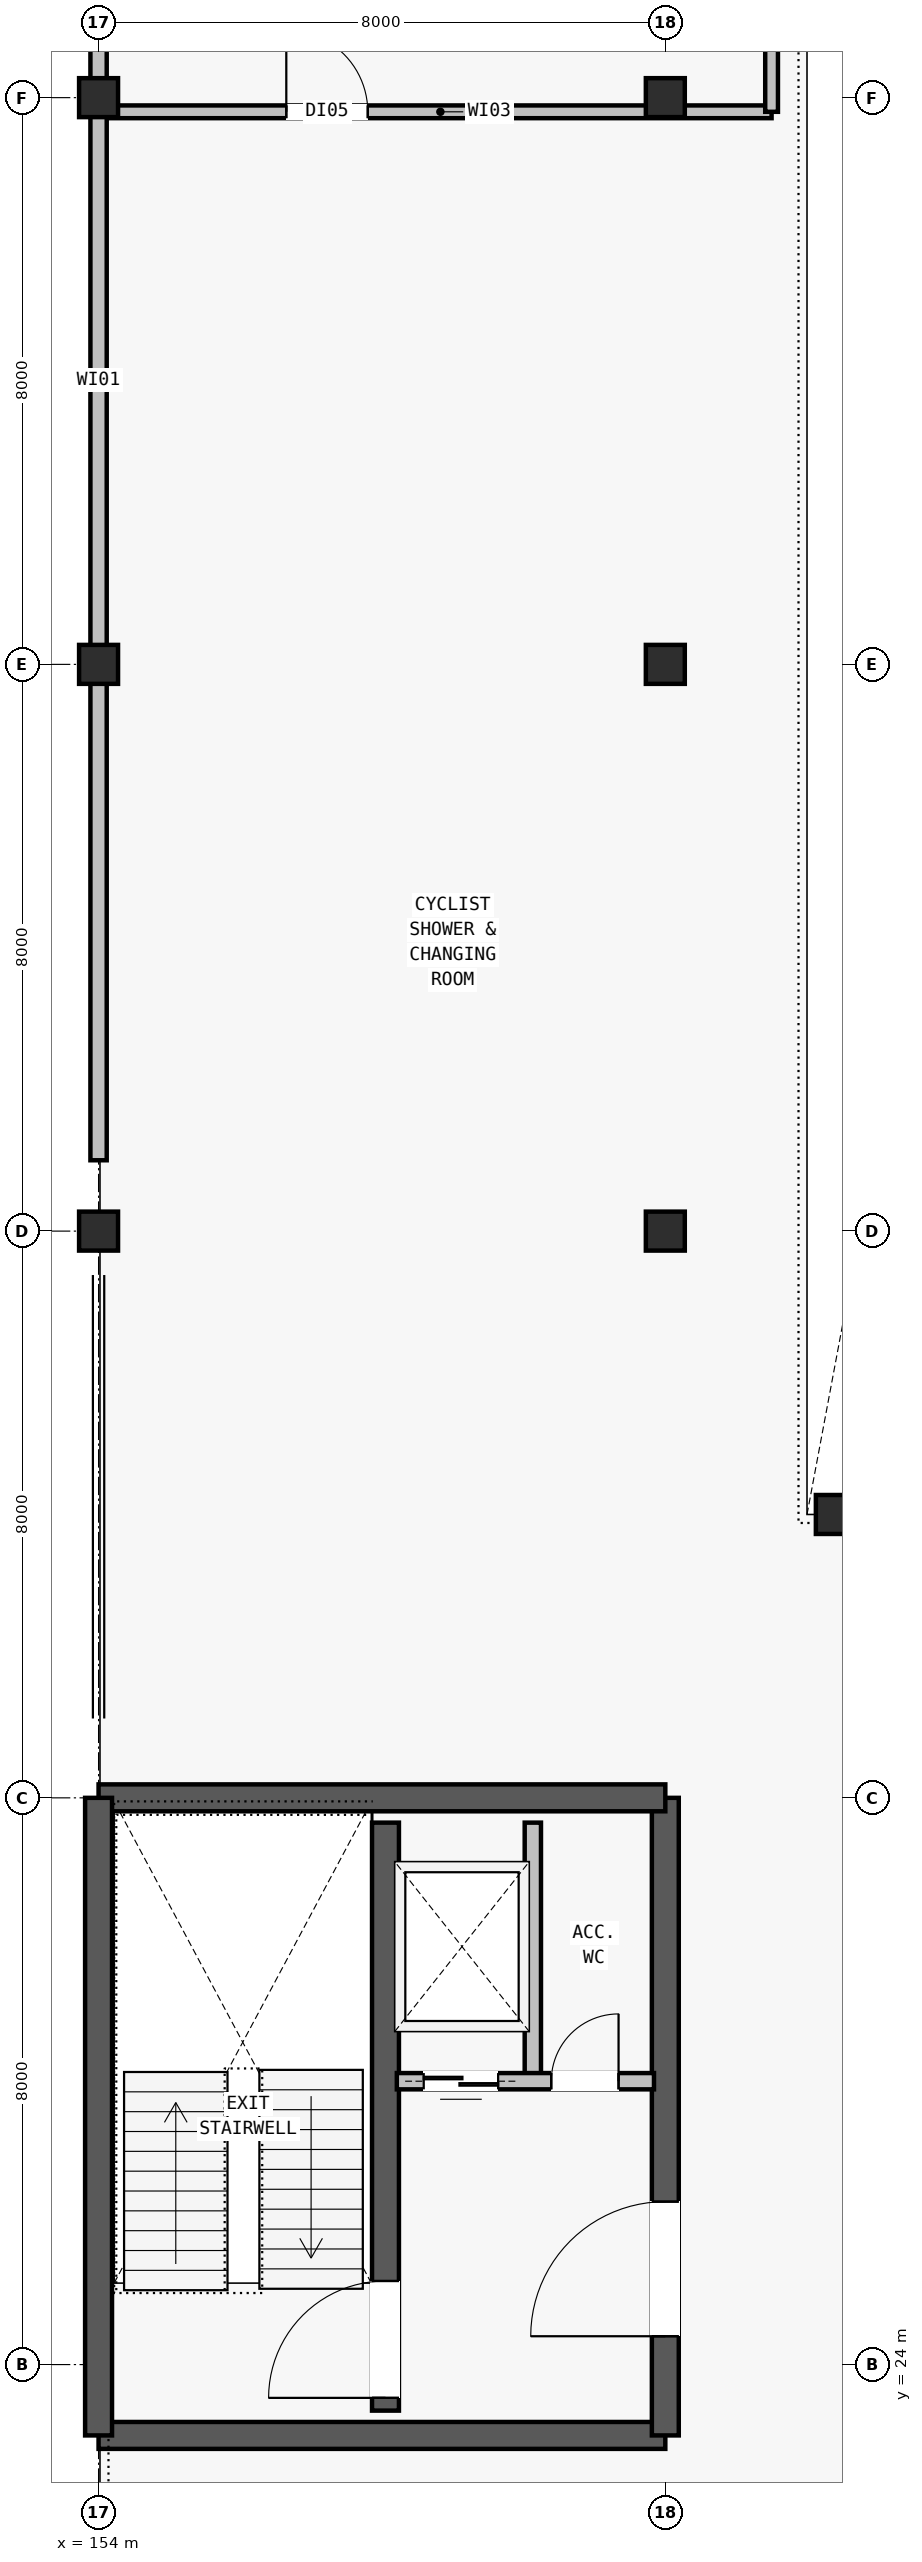
"""IFC4 building model, lengths in metres.
Left out: names, types, materials, properties, quantities, classifications, styles, units other than length and angle.
Written with IfcOpenShell. Run it as: python <this file> out.ifc"""

import sys

from ifc_helpers import new_model, si_unit, direction, frame, frame_2d, origin, origin_2d, place, context, subcontext, project, spatial, rectangle, extrude, element, fill, save


model = new_model("IFC4")
c1 = context("Model", 3, precision=1e-05, world=origin(), true_north=direction((0.0, 1.0)))
c2 = subcontext(c1, "Body", "Model", "MODEL_VIEW")
j1 = project(units=[si_unit("LENGTHUNIT", "METRE"), si_unit("PLANEANGLEUNIT", "RADIAN")], contexts=[c1])
p1 = place(None, origin())
s1 = spatial("IfcSite", under=j1, at=p1, CompositionType="ELEMENT")
p2 = place(p1, origin())
s2 = spatial("IfcBuilding", under=s1, at=p2, CompositionType="ELEMENT")
p3 = place(p2, frame((0.0, 0.0, 13.4)))
s3 = spatial("IfcBuildingStorey", under=s2, at=p3, CompositionType="ELEMENT", Elevation=13.4)
for number, where, z_axis, x_axis in (
    (1, (154.0, 40.0, 0.0), (0.0, 0.0, 1.0), (1.0, 0.0, 0.0)),
    (2, (154.0, 48.0, 0.0), (0.0, 0.0, 1.0), (1.0, 0.0, 0.0)),
    (3, (154.0, 56.0, 0.0), (0.0, 0.0, 1.0), (1.0, 0.0, 0.0)),
    (4, (162.0, 40.0, 0.0), (0.0, 0.0, 1.0), (1.0, 0.0, 0.0)),
    (5, (162.0, 48.0, 0.0), (0.0, 0.0, 1.0), (1.0, 0.0, 0.0)),
    (6, (162.0, 56.0, 0.0), (0.0, 0.0, 1.0), (1.0, 0.0, 0.0)),
    (7, (164.4, 36.0, 0.0), (0.0, 0.0, 1.0), (1.0, 0.0, 0.0)),
):
    element("IfcColumn", number, at=place(p3, frame(where, z_axis=z_axis, x_axis=x_axis)), inside=s3, PredefinedType="COLUMN", context=c2, shape_type="SweptSolid", body=[
        extrude(rectangle(XDim=0.55, YDim=0.55, at=origin_2d()), origin(), (0.0, 0.0, 1.0), 3.9),
    ])
p4 = place(p3, frame((154.0, 23.0, 0.0), z_axis=(0.0, 0.0, 1.0), x_axis=(1.0, 0.0, 0.0)))
e8 = element("IfcWall", 8, at=p4, inside=s3, PredefinedType="SHEAR", context=c2, shape_type="SweptSolid", body=[
    extrude(rectangle(XDim=8.0, YDim=0.38, at=frame_2d((4.0, 0.0))), origin(), (0.0, 0.0, 1.0), 3.62),
])
p5 = place(p3, frame((162.0, 23.0, 0.0), z_axis=(0.0, 0.0, 1.0), x_axis=(0.0, 1.0, 0.0)))
e9 = element("IfcWall", 9, at=p5, inside=s3, PredefinedType="SHEAR", context=c2, shape_type="SweptSolid", body=[
    extrude(rectangle(XDim=9.0, YDim=0.38, at=frame_2d((4.5, 0.0))), origin(), (0.0, 0.0, 1.0), 3.62),
])
p6 = place(p5, frame((1.4, 0.0, 0.0)))
e10 = element("IfcOpeningElement", 10, at=p6, cuts=e9, PredefinedType="OPENING", context=c2, shape_type="SweptSolid", body=[
    extrude(rectangle(XDim=1.9, YDim=2.3, at=frame_2d((0.95, 1.15))), frame((0.0, 0.2, 0.0), z_axis=(0.0, -1.0, 0.0), x_axis=(1.0, 0.0, 0.0)), (0.0, 0.0, 1.0), 0.4),
])
p7 = place(p3, frame((162.0, 32.0, 0.0), z_axis=(0.0, 0.0, 1.0), x_axis=(-1.0, 0.0, 0.0)))
e11 = element("IfcWall", 11, at=p7, inside=s3, PredefinedType="SHEAR", context=c2, shape_type="SweptSolid", body=[
    extrude(rectangle(XDim=8.0, YDim=0.38, at=frame_2d((4.0, 0.0))), origin(), (0.0, 0.0, 1.0), 3.62),
])
p8 = place(p3, frame((154.0, 32.0, 0.0), z_axis=(0.0, 0.0, 1.0), x_axis=(0.0, -1.0, 0.0)))
e12 = element("IfcWall", 12, at=p8, inside=s3, PredefinedType="SHEAR", context=c2, shape_type="SweptSolid", body=[
    extrude(rectangle(XDim=9.0, YDim=0.38, at=frame_2d((4.5, 0.0))), origin(), (0.0, 0.0, 1.0), 3.62),
])
p9 = place(p3, frame((158.05, 23.35, 0.0), z_axis=(0.0, 0.0, 1.0), x_axis=(0.0, 1.0, 0.0)))
e13 = element("IfcWall", 13, at=p9, inside=s3, PredefinedType="SHEAR", context=c2, shape_type="SweptSolid", body=[
    extrude(rectangle(XDim=8.3, YDim=0.38, at=frame_2d((4.15, 0.0))), origin(), (0.0, 0.0, 1.0), 3.62),
])
p10 = place(p9, frame((0.18, 0.0, 0.0)))
e14 = element("IfcOpeningElement", 14, at=p10, cuts=e13, PredefinedType="OPENING", context=c2, shape_type="SweptSolid", body=[
    extrude(rectangle(XDim=1.65, YDim=2.2, at=frame_2d((0.825, 1.1))), frame((0.0, 0.2, 0.0), z_axis=(0.0, -1.0, 0.0), x_axis=(1.0, 0.0, 0.0)), (0.0, 0.0, 1.0), 0.4),
])
p11 = place(p3, frame((160.13, 28.0, 0.0), z_axis=(0.0, 0.0, 1.0), x_axis=(0.0, 1.0, 0.0)))
e15 = element("IfcWall", 15, at=p11, inside=s3, PredefinedType="PARTITIONING", context=c2, shape_type="SweptSolid", body=[
    extrude(rectangle(XDim=3.65, YDim=0.23, at=frame_2d((1.825, 0.0))), origin(), (0.0, 0.0, 1.0), 2.48),
])
p12 = place(p3, frame((158.21, 28.0, 0.0), z_axis=(0.0, 0.0, 1.0), x_axis=(1.0, 0.0, 0.0)))
e16 = element("IfcWall", 16, at=p12, inside=s3, PredefinedType="PARTITIONING", context=c2, shape_type="SweptSolid", body=[
    extrude(rectangle(XDim=3.63, YDim=0.23, at=frame_2d((1.815, 0.0))), origin(), (0.0, 0.0, 1.0), 2.48),
])
p13 = place(p12, frame((0.38, 0.0, 0.0)))
e17 = element("IfcOpeningElement", 17, at=p13, cuts=e16, PredefinedType="OPENING", context=c2, shape_type="SweptSolid", body=[
    extrude(rectangle(XDim=1.05, YDim=2.15, at=frame_2d((0.525, 1.075))), frame((0.0, 0.125, 0.0), z_axis=(0.0, -1.0, 0.0), x_axis=(1.0, 0.0, 0.0)), (0.0, 0.0, 1.0), 0.25),
])
p14 = place(p12, frame((2.18, 0.0, 0.0)))
e18 = element("IfcOpeningElement", 18, at=p14, cuts=e16, PredefinedType="OPENING", context=c2, shape_type="SweptSolid", body=[
    extrude(rectangle(XDim=0.95, YDim=2.1, at=frame_2d((0.475, 1.05))), frame((0.0, 0.125, 0.0), z_axis=(0.0, -1.0, 0.0), x_axis=(1.0, 0.0, 0.0)), (0.0, 0.0, 1.0), 0.25),
])
p15 = place(p3, frame((154.0, 41.0, 0.0), z_axis=(0.0, 0.0, 1.0), x_axis=(0.0, 1.0, 0.0)))
e19 = element("IfcWall", 19, at=p15, inside=s3, PredefinedType="PARTITIONING", context=c2, shape_type="SweptSolid", body=[
    extrude(rectangle(XDim=36.6, YDim=0.23, at=frame_2d((18.3, 0.0))), origin(), (0.0, 0.0, 1.0), 2.48),
])
p16 = place(p3, frame((154.15, 55.8, 0.0), z_axis=(0.0, 0.0, 1.0), x_axis=(1.0, 0.0, 0.0)))
e20 = element("IfcWall", 20, at=p16, inside=s3, PredefinedType="PARTITIONING", context=c2, shape_type="SweptSolid", body=[
    extrude(rectangle(XDim=9.35, YDim=0.18, at=frame_2d((4.675, 0.0))), origin(), (0.0, 0.0, 1.0), 2.48),
])
p17 = place(p16, frame((2.5, 0.0, 0.0)))
e21 = element("IfcOpeningElement", 21, at=p17, cuts=e20, PredefinedType="OPENING", context=c2, shape_type="SweptSolid", body=[
    extrude(rectangle(XDim=1.15, YDim=2.15, at=frame_2d((0.575, 1.075))), frame((0.0, 0.1, 0.0), z_axis=(0.0, -1.0, 0.0), x_axis=(1.0, 0.0, 0.0)), (0.0, 0.0, 1.0), 0.2),
])
p18 = place(p3, frame((163.5, 55.8, 0.0), z_axis=(0.0, 0.0, 1.0), x_axis=(0.0, 1.0, 0.0)))
e22 = element("IfcWall", 22, at=p18, inside=s3, PredefinedType="PARTITIONING", context=c2, shape_type="SweptSolid", body=[
    extrude(rectangle(XDim=7.05, YDim=0.18, at=frame_2d((3.525, 0.0))), origin(), (0.0, 0.0, 1.0), 2.48),
])
p19 = place(p6, origin())
e23 = element("IfcDoor", 23, at=p19, inside=s3, OperationType="SINGLE_SWING_LEFT", PredefinedType="DOOR", context=c2, shape_type="SweptSolid", body=[
    extrude(rectangle(XDim=1.9, YDim=2.3, at=frame_2d((0.95, 1.15))), frame((0.0, 0.025, 0.0), z_axis=(0.0, -1.0, 0.0), x_axis=(1.0, 0.0, 0.0)), (0.0, 0.0, 1.0), 0.05),
])
fill(e10, e23)
p20 = place(p10, origin())
e24 = element("IfcDoor", 24, at=p20, inside=s3, OperationType="SINGLE_SWING_LEFT", PredefinedType="DOOR", context=c2, shape_type="SweptSolid", body=[
    extrude(rectangle(XDim=1.65, YDim=2.2, at=frame_2d((0.825, 1.1))), frame((0.0, 0.025, 0.0), z_axis=(0.0, -1.0, 0.0), x_axis=(1.0, 0.0, 0.0)), (0.0, 0.0, 1.0), 0.05),
])
fill(e14, e24)
p21 = place(p13, origin())
e25 = element("IfcDoor", 25, at=p21, inside=s3, OperationType="SLIDING_TO_LEFT", PredefinedType="DOOR", context=c2, shape_type="SweptSolid", body=[
    extrude(rectangle(XDim=1.05, YDim=2.15, at=frame_2d((0.525, 1.075))), frame((0.0, 0.025, 0.0), z_axis=(0.0, -1.0, 0.0), x_axis=(1.0, 0.0, 0.0)), (0.0, 0.0, 1.0), 0.05),
])
fill(e17, e25)
p22 = place(p14, origin())
e26 = element("IfcDoor", 26, at=p22, inside=s3, OperationType="SINGLE_SWING_RIGHT", PredefinedType="DOOR", context=c2, shape_type="SweptSolid", body=[
    extrude(rectangle(XDim=0.95, YDim=2.1, at=frame_2d((0.475, 1.05))), frame((0.0, 0.025, 0.0), z_axis=(0.0, -1.0, 0.0), x_axis=(1.0, 0.0, 0.0)), (0.0, 0.0, 1.0), 0.05),
])
fill(e18, e26)
p23 = place(p17, origin())
e27 = element("IfcDoor", 27, at=p23, inside=s3, OperationType="SINGLE_SWING_LEFT", PredefinedType="DOOR", context=c2, shape_type="SweptSolid", body=[
    extrude(rectangle(XDim=1.15, YDim=2.15, at=frame_2d((0.575, 1.075))), frame((0.0, 0.025, 0.0), z_axis=(0.0, -1.0, 0.0), x_axis=(1.0, 0.0, 0.0)), (0.0, 0.0, 1.0), 0.05),
])
fill(e21, e27)
save(model, sys.argv[1])
